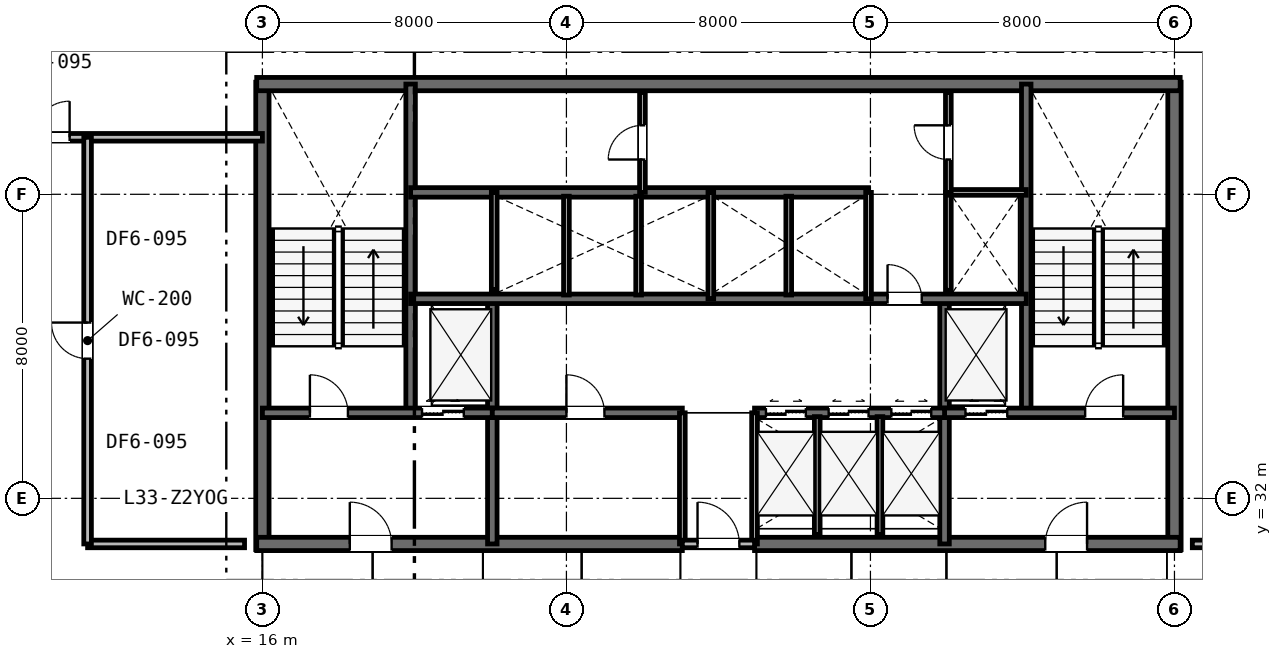
"""IFC4 building model, lengths in metres.
Left out: names, types, materials, properties, quantities, classifications, styles, units other than length and angle.
Written with IfcOpenShell. Run it as: python <this file> out.ifc"""

import sys

from ifc_helpers import new_model, si_unit, direction, frame, frame_2d, origin, place, context, subcontext, project, spatial, rectangle, extrude, element, fill, save


model = new_model("IFC4")
c1 = context("Model", 3, precision=1e-05, world=origin(), true_north=direction((0.0, 1.0)))
c2 = subcontext(c1, "Body", "Model", "MODEL_VIEW")
j1 = project(units=[si_unit("LENGTHUNIT", "METRE"), si_unit("PLANEANGLEUNIT", "RADIAN")], contexts=[c1])
p1 = place(None, origin())
s1 = spatial("IfcSite", under=j1, at=p1, CompositionType="ELEMENT")
p2 = place(p1, origin())
s2 = spatial("IfcBuilding", under=s1, at=p2, CompositionType="ELEMENT")
p3 = place(p2, frame((0.0, 0.0, 129.6)))
s3 = spatial("IfcBuildingStorey", under=s2, at=p3, CompositionType="ELEMENT", Elevation=129.6)
for number, where, z_axis, x_axis in (
    (1, (16.0, 30.65, 0.0), (0.0, 0.0, 1.0), (0.0, 1.0, 0.0)),
    (2, (40.0, 30.65, 0.0), (0.0, 0.0, 1.0), (0.0, 1.0, 0.0)),
):
    element("IfcWall", number, at=place(p3, frame(where, z_axis=z_axis, x_axis=x_axis)), inside=s3, PredefinedType="SHEAR", context=c2, shape_type="SweptSolid", body=[
        extrude(rectangle(XDim=12.3, YDim=0.35, at=frame_2d((6.15, 0.0))), origin(), (0.0, 0.0, 1.0), 3.6),
    ])
p4 = place(p3, frame((15.85, 42.9, 0.0), z_axis=(0.0, 0.0, 1.0), x_axis=(1.0, 0.0, 0.0)))
e3 = element("IfcWall", 3, at=p4, inside=s3, PredefinedType="SHEAR", context=c2, shape_type="SweptSolid", body=[
    extrude(rectangle(XDim=24.3, YDim=0.35, at=frame_2d((12.15, 0.0))), origin(), (0.0, 0.0, 1.0), 3.6),
])
p5 = place(p3, frame((15.85, 30.8, 0.0), z_axis=(0.0, 0.0, 1.0), x_axis=(1.0, 0.0, 0.0)))
e4 = element("IfcWall", 4, at=p5, inside=s3, PredefinedType="SHEAR", context=c2, shape_type="SweptSolid", body=[
    extrude(rectangle(XDim=11.2, YDim=0.35, at=frame_2d((5.6, 0.0))), origin(), (0.0, 0.0, 1.0), 3.6),
])
p6 = place(p5, frame((2.45, 0.0, 0.0)))
e5 = element("IfcOpeningElement", 5, at=p6, cuts=e4, PredefinedType="OPENING", context=c2, shape_type="SweptSolid", body=[
    extrude(rectangle(XDim=1.1, YDim=2.15, at=frame_2d((0.55, 1.075))), frame((0.0, 0.185, 0.0), z_axis=(0.0, -1.0, 0.0), x_axis=(1.0, 0.0, 0.0)), (0.0, 0.0, 1.0), 0.37),
])
p7 = place(p3, frame((28.95, 30.8, 0.0), z_axis=(0.0, 0.0, 1.0), x_axis=(1.0, 0.0, 0.0)))
e6 = element("IfcWall", 6, at=p7, inside=s3, PredefinedType="SHEAR", context=c2, shape_type="SweptSolid", body=[
    extrude(rectangle(XDim=11.2, YDim=0.35, at=frame_2d((5.6, 0.0))), origin(), (0.0, 0.0, 1.0), 3.6),
])
p8 = place(p7, frame((7.65, 0.0, 0.0)))
e7 = element("IfcOpeningElement", 7, at=p8, cuts=e6, PredefinedType="OPENING", context=c2, shape_type="SweptSolid", body=[
    extrude(rectangle(XDim=1.1, YDim=2.15, at=frame_2d((0.55, 1.075))), frame((0.0, 0.185, 0.0), z_axis=(0.0, -1.0, 0.0), x_axis=(1.0, 0.0, 0.0)), (0.0, 0.0, 1.0), 0.37),
])
for number, where, z_axis, x_axis in (
    (8, (19.9, 34.25, 0.0), (0.0, 0.0, 1.0), (0.0, 1.0, 0.0)),
    (9, (36.1, 34.25, 0.0), (0.0, 0.0, 1.0), (0.0, 1.0, 0.0)),
):
    element("IfcWall", number, at=place(p3, frame(where, z_axis=z_axis, x_axis=x_axis)), inside=s3, PredefinedType="SHEAR", context=c2, shape_type="SweptSolid", body=[
        extrude(rectangle(XDim=8.65, YDim=0.25, at=frame_2d((4.325, 0.0))), origin(), (0.0, 0.0, 1.0), 3.6),
    ])
for number, where, z_axis, x_axis in (
    (10, (22.05, 30.8, 0.0), (0.0, 0.0, 1.0), (0.0, 1.0, 0.0)),
    (11, (33.95, 30.8, 0.0), (0.0, 0.0, 1.0), (0.0, 1.0, 0.0)),
):
    element("IfcWall", number, at=place(p3, frame(where, z_axis=z_axis, x_axis=x_axis)), inside=s3, PredefinedType="SHEAR", context=c2, shape_type="SweptSolid", body=[
        extrude(rectangle(XDim=6.45, YDim=0.25, at=frame_2d((3.225, 0.0))), origin(), (0.0, 0.0, 1.0), 3.6),
    ])
p9 = place(p3, frame((16.0, 34.25, 0.0), z_axis=(0.0, 0.0, 1.0), x_axis=(1.0, 0.0, 0.0)))
e12 = element("IfcWall", 12, at=p9, inside=s3, PredefinedType="SHEAR", context=c2, shape_type="SweptSolid", body=[
    extrude(rectangle(XDim=6.05, YDim=0.25, at=frame_2d((3.025, 0.0))), origin(), (0.0, 0.0, 1.0), 3.6),
])
p10 = place(p9, frame((1.25, 0.0, 0.0)))
e13 = element("IfcOpeningElement", 13, at=p10, cuts=e12, PredefinedType="OPENING", context=c2, shape_type="SweptSolid", body=[
    extrude(rectangle(XDim=1.0, YDim=2.15, at=frame_2d((0.5, 1.075))), frame((0.0, 0.135, 0.0), z_axis=(0.0, -1.0, 0.0), x_axis=(1.0, 0.0, 0.0)), (0.0, 0.0, 1.0), 0.27),
])
p11 = place(p9, frame((4.2, 0.0, 0.0)))
e14 = element("IfcOpeningElement", 14, at=p11, cuts=e12, PredefinedType="OPENING", context=c2, shape_type="SweptSolid", body=[
    extrude(rectangle(XDim=1.1, YDim=2.15, at=frame_2d((0.55, 1.075))), frame((0.0, 0.135, 0.0), z_axis=(0.0, -1.0, 0.0), x_axis=(1.0, 0.0, 0.0)), (0.0, 0.0, 1.0), 0.27),
])
p12 = place(p3, frame((33.95, 34.25, 0.0), z_axis=(0.0, 0.0, 1.0), x_axis=(1.0, 0.0, 0.0)))
e15 = element("IfcWall", 15, at=p12, inside=s3, PredefinedType="SHEAR", context=c2, shape_type="SweptSolid", body=[
    extrude(rectangle(XDim=6.05, YDim=0.25, at=frame_2d((3.025, 0.0))), origin(), (0.0, 0.0, 1.0), 3.6),
])
p13 = place(p12, frame((3.7, 0.0, 0.0)))
e16 = element("IfcOpeningElement", 16, at=p13, cuts=e15, PredefinedType="OPENING", context=c2, shape_type="SweptSolid", body=[
    extrude(rectangle(XDim=1.0, YDim=2.15, at=frame_2d((0.5, 1.075))), frame((0.0, 0.135, 0.0), z_axis=(0.0, -1.0, 0.0), x_axis=(1.0, 0.0, 0.0)), (0.0, 0.0, 1.0), 0.27),
])
p14 = place(p12, frame((0.55, 0.0, 0.0)))
e17 = element("IfcOpeningElement", 17, at=p14, cuts=e15, PredefinedType="OPENING", context=c2, shape_type="SweptSolid", body=[
    extrude(rectangle(XDim=1.1, YDim=2.15, at=frame_2d((0.55, 1.075))), frame((0.0, 0.135, 0.0), z_axis=(0.0, -1.0, 0.0), x_axis=(1.0, 0.0, 0.0)), (0.0, 0.0, 1.0), 0.27),
])
p15 = place(p3, frame((22.05, 34.25, 0.0), z_axis=(0.0, 0.0, 1.0), x_axis=(1.0, 0.0, 0.0)))
e18 = element("IfcWall", 18, at=p15, inside=s3, PredefinedType="SHEAR", context=c2, shape_type="SweptSolid", body=[
    extrude(rectangle(XDim=5.0, YDim=0.25, at=frame_2d((2.5, 0.0))), origin(), (0.0, 0.0, 1.0), 3.6),
])
p16 = place(p15, frame((1.95, 0.0, 0.0)))
e19 = element("IfcOpeningElement", 19, at=p16, cuts=e18, PredefinedType="OPENING", context=c2, shape_type="SweptSolid", body=[
    extrude(rectangle(XDim=1.0, YDim=2.15, at=frame_2d((0.5, 1.075))), frame((0.0, 0.135, 0.0), z_axis=(0.0, -1.0, 0.0), x_axis=(1.0, 0.0, 0.0)), (0.0, 0.0, 1.0), 0.27),
])
p17 = place(p3, frame((28.95, 34.25, 0.0), z_axis=(0.0, 0.0, 1.0), x_axis=(1.0, 0.0, 0.0)))
e20 = element("IfcWall", 20, at=p17, inside=s3, PredefinedType="SHEAR", context=c2, shape_type="SweptSolid", body=[
    extrude(rectangle(XDim=5.0, YDim=0.25, at=frame_2d((2.5, 0.0))), origin(), (0.0, 0.0, 1.0), 3.6),
])
p18 = place(p17, frame((0.3, 0.0, 0.0)))
e21 = element("IfcOpeningElement", 21, at=p18, cuts=e20, PredefinedType="OPENING", context=c2, shape_type="SweptSolid", body=[
    extrude(rectangle(XDim=1.05, YDim=2.15, at=frame_2d((0.525, 1.075))), frame((0.0, 0.135, 0.0), z_axis=(0.0, -1.0, 0.0), x_axis=(1.0, 0.0, 0.0)), (0.0, 0.0, 1.0), 0.27),
])
p19 = place(p17, frame((1.95, 0.0, 0.0)))
e22 = element("IfcOpeningElement", 22, at=p19, cuts=e20, PredefinedType="OPENING", context=c2, shape_type="SweptSolid", body=[
    extrude(rectangle(XDim=1.05, YDim=2.15, at=frame_2d((0.525, 1.075))), frame((0.0, 0.135, 0.0), z_axis=(0.0, -1.0, 0.0), x_axis=(1.0, 0.0, 0.0)), (0.0, 0.0, 1.0), 0.27),
])
p20 = place(p17, frame((3.6, 0.0, 0.0)))
e23 = element("IfcOpeningElement", 23, at=p20, cuts=e20, PredefinedType="OPENING", context=c2, shape_type="SweptSolid", body=[
    extrude(rectangle(XDim=1.05, YDim=2.15, at=frame_2d((0.525, 1.075))), frame((0.0, 0.135, 0.0), z_axis=(0.0, -1.0, 0.0), x_axis=(1.0, 0.0, 0.0)), (0.0, 0.0, 1.0), 0.27),
])
p21 = place(p3, frame((19.9, 37.25, 0.0), z_axis=(0.0, 0.0, 1.0), x_axis=(1.0, 0.0, 0.0)))
e24 = element("IfcWall", 24, at=p21, inside=s3, PredefinedType="SHEAR", context=c2, shape_type="SweptSolid", body=[
    extrude(rectangle(XDim=16.2, YDim=0.25, at=frame_2d((8.1, 0.0))), origin(), (0.0, 0.0, 1.0), 3.6),
])
p22 = place(p21, frame((12.55, 0.0, 0.0)))
e25 = element("IfcOpeningElement", 25, at=p22, cuts=e24, PredefinedType="OPENING", context=c2, shape_type="SweptSolid", body=[
    extrude(rectangle(XDim=0.9, YDim=2.15, at=frame_2d((0.45, 1.075))), frame((0.0, 0.135, 0.0), z_axis=(0.0, -1.0, 0.0), x_axis=(1.0, 0.0, 0.0)), (0.0, 0.0, 1.0), 0.27),
])
p23 = place(p3, frame((19.9, 40.05, 0.0), z_axis=(0.0, 0.0, 1.0), x_axis=(1.0, 0.0, 0.0)))
e26 = element("IfcWall", 26, at=p23, inside=s3, PredefinedType="SHEAR", context=c2, shape_type="SweptSolid", body=[
    extrude(rectangle(XDim=12.05, YDim=0.25, at=frame_2d((6.025, 0.0))), origin(), (0.0, 0.0, 1.0), 3.6),
])
p24 = place(p3, frame((27.05, 30.8, 0.0), z_axis=(0.0, 0.0, 1.0), x_axis=(0.0, 1.0, 0.0)))
e27 = element("IfcWall", 27, at=p24, inside=s3, PredefinedType="PLUMBINGWALL", context=c2, shape_type="SweptSolid", body=[
    extrude(rectangle(XDim=3.45, YDim=0.15, at=frame_2d((1.725, 0.0))), origin(), (0.0, 0.0, 1.0), 3.01),
])
p25 = place(p3, frame((28.95, 30.8, 0.0), z_axis=(0.0, 0.0, 1.0), x_axis=(0.0, 1.0, 0.0)))
e28 = element("IfcWall", 28, at=p25, inside=s3, PredefinedType="PLUMBINGWALL", context=c2, shape_type="SweptSolid", body=[
    extrude(rectangle(XDim=3.45, YDim=0.15, at=frame_2d((1.725, 0.0))), origin(), (0.0, 0.0, 1.0), 3.33),
])
p26 = place(p3, frame((27.05, 30.8, 0.0), z_axis=(0.0, 0.0, 1.0), x_axis=(1.0, 0.0, 0.0)))
e29 = element("IfcWall", 29, at=p26, inside=s3, PredefinedType="PARTITIONING", context=c2, shape_type="SweptSolid", body=[
    extrude(rectangle(XDim=1.9, YDim=0.2, at=frame_2d((0.95, 0.0))), origin(), (0.0, 0.0, 1.0), 3.01),
])
p27 = place(p26, frame((0.4, 0.0, 0.0)))
e30 = element("IfcOpeningElement", 30, at=p27, cuts=e29, PredefinedType="OPENING", context=c2, shape_type="SweptSolid", body=[
    extrude(rectangle(XDim=1.1, YDim=2.15, at=frame_2d((0.55, 1.075))), frame((0.0, 0.11, 0.0), z_axis=(0.0, -1.0, 0.0), x_axis=(1.0, 0.0, 0.0)), (0.0, 0.0, 1.0), 0.22),
])
for number, where, z_axis, x_axis in (
    (31, (30.6, 31.05, 0.0), (0.0, 0.0, 1.0), (0.0, 1.0, 0.0)),
    (32, (32.25, 31.05, 0.0), (0.0, 0.0, 1.0), (0.0, 1.0, 0.0)),
):
    element("IfcWall", number, at=place(p3, frame(where, z_axis=z_axis, x_axis=x_axis)), inside=s3, PredefinedType="PLUMBINGWALL", context=c2, shape_type="SweptSolid", body=[
        extrude(rectangle(XDim=3.1, YDim=0.15, at=frame_2d((1.55, 0.0))), origin(), (0.0, 0.0, 1.0), 3.33),
    ])
p28 = place(p3, frame((22.1, 37.49, 0.0), z_axis=(0.0, 0.0, 1.0), x_axis=(0.0, 1.0, 0.0)))
e33 = element("IfcWall", 33, at=p28, inside=s3, PredefinedType="PLUMBINGWALL", context=c2, shape_type="SweptSolid", body=[
    extrude(rectangle(XDim=2.56, YDim=0.15, at=frame_2d((1.28, 0.0))), origin(), (0.0, 0.0, 1.0), 3.33),
])
p29 = place(p3, frame((27.8, 37.25, 0.0), z_axis=(0.0, 0.0, 1.0), x_axis=(0.0, 1.0, 0.0)))
e34 = element("IfcWall", 34, at=p29, inside=s3, PredefinedType="PLUMBINGWALL", context=c2, shape_type="SweptSolid", body=[
    extrude(rectangle(XDim=2.8, YDim=0.15, at=frame_2d((1.4, 0.0))), origin(), (0.0, 0.0, 1.0), 3.33),
])
for number, where, z_axis, x_axis in (
    (35, (24.0, 37.35, 0.0), (0.0, 0.0, 1.0), (0.0, 1.0, 0.0)),
    (36, (25.9, 37.35, 0.0), (0.0, 0.0, 1.0), (0.0, 1.0, 0.0)),
):
    element("IfcWall", number, at=place(p3, frame(where, z_axis=z_axis, x_axis=x_axis)), inside=s3, PredefinedType="PLUMBINGWALL", context=c2, shape_type="SweptSolid", body=[
        extrude(rectangle(XDim=2.6, YDim=0.15, at=frame_2d((1.3, 0.0))), origin(), (0.0, 0.0, 1.0), 3.33),
    ])
p30 = place(p3, frame((31.95, 37.25, 0.0), z_axis=(0.0, 0.0, 1.0), x_axis=(0.0, 1.0, 0.0)))
e37 = element("IfcWall", 37, at=p30, inside=s3, PredefinedType="PLUMBINGWALL", context=c2, shape_type="SweptSolid", body=[
    extrude(rectangle(XDim=2.8, YDim=0.15, at=frame_2d((1.4, 0.0))), origin(), (0.0, 0.0, 1.0), 3.33),
])
p31 = place(p3, frame((29.85, 37.35, 0.0), z_axis=(0.0, 0.0, 1.0), x_axis=(0.0, 1.0, 0.0)))
e38 = element("IfcWall", 38, at=p31, inside=s3, PredefinedType="PLUMBINGWALL", context=c2, shape_type="SweptSolid", body=[
    extrude(rectangle(XDim=2.6, YDim=0.15, at=frame_2d((1.3, 0.0))), origin(), (0.0, 0.0, 1.0), 3.33),
])
p32 = place(p3, frame((34.05, 37.473, 0.0), z_axis=(0.0, 0.0, 1.0), x_axis=(0.0, 1.0, 0.0)))
e39 = element("IfcWall", 39, at=p32, inside=s3, PredefinedType="PLUMBINGWALL", context=c2, shape_type="SweptSolid", body=[
    extrude(rectangle(XDim=2.577, YDim=0.15, at=frame_2d((1.288, 0.0))), origin(), (0.0, 0.0, 1.0), 3.33),
])
p33 = place(p3, frame((34.05, 40.05, 0.0), z_axis=(0.0, 0.0, 1.0), x_axis=(1.0, 0.0, 0.0)))
e40 = element("IfcWall", 40, at=p33, inside=s3, PredefinedType="PARTITIONING", context=c2, shape_type="SweptSolid", body=[
    extrude(rectangle(XDim=2.05, YDim=0.15, at=frame_2d((1.025, 0.0))), origin(), (0.0, 0.0, 1.0), 3.33),
])
p34 = place(p3, frame((34.05, 40.05, 0.0), z_axis=(0.0, 0.0, 1.0), x_axis=(0.0, 1.0, 0.0)))
e41 = element("IfcWall", 41, at=p34, inside=s3, PredefinedType="PARTITIONING", context=c2, shape_type="SweptSolid", body=[
    extrude(rectangle(XDim=2.63, YDim=0.15, at=frame_2d((1.315, 0.0))), origin(), (0.0, 0.0, 1.0), 3.33),
])
p35 = place(p34, frame((0.865, 0.0, 0.0)))
e42 = element("IfcOpeningElement", 42, at=p35, cuts=e41, PredefinedType="OPENING", context=c2, shape_type="SweptSolid", body=[
    extrude(rectangle(XDim=0.9, YDim=2.15, at=frame_2d((0.45, 1.075))), frame((0.0, 0.085, 0.0), z_axis=(0.0, -1.0, 0.0), x_axis=(1.0, 0.0, 0.0)), (0.0, 0.0, 1.0), 0.17),
])
p36 = place(p3, frame((26.0, 40.05, 0.0), z_axis=(0.0, 0.0, 1.0), x_axis=(0.0, 1.0, 0.0)))
e43 = element("IfcWall", 43, at=p36, inside=s3, PredefinedType="PARTITIONING", context=c2, shape_type="SweptSolid", body=[
    extrude(rectangle(XDim=2.63, YDim=0.15, at=frame_2d((1.315, 0.0))), origin(), (0.0, 0.0, 1.0), 3.33),
])
p37 = place(p36, frame((0.865, 0.0, 0.0)))
e44 = element("IfcOpeningElement", 44, at=p37, cuts=e43, PredefinedType="OPENING", context=c2, shape_type="SweptSolid", body=[
    extrude(rectangle(XDim=0.9, YDim=2.15, at=frame_2d((0.45, 1.075))), frame((0.0, 0.085, 0.0), z_axis=(0.0, -1.0, 0.0), x_axis=(1.0, 0.0, 0.0)), (0.0, 0.0, 1.0), 0.17),
])
p38 = place(p3, frame((11.4, 30.8, 0.0), z_axis=(0.0, 0.0, 1.0), x_axis=(1.0, 0.0, 0.0)))
e45 = element("IfcWall", 45, at=p38, inside=s3, PredefinedType="PARTITIONING", context=c2, shape_type="SweptSolid", body=[
    extrude(rectangle(XDim=4.13, YDim=0.2, at=frame_2d((2.065, 0.0))), origin(), (0.0, 0.0, 1.0), 2.87),
])
p39 = place(p3, frame((40.47, 30.8, 0.0), z_axis=(0.0, 0.0, 1.0), x_axis=(1.0, 0.0, 0.0)))
e46 = element("IfcWall", 46, at=p39, inside=s3, PredefinedType="PARTITIONING", context=c2, shape_type="SweptSolid", body=[
    extrude(rectangle(XDim=1.73, YDim=0.2, at=frame_2d((0.865, 0.0))), origin(), (0.0, 0.0, 1.0), 2.87),
])
p40 = place(p3, frame((0.1, 41.5, 0.0), z_axis=(0.0, 0.0, 1.0), x_axis=(1.0, 0.0, 0.0)))
e47 = element("IfcWall", 47, at=p40, inside=s3, PredefinedType="PARTITIONING", context=c2, shape_type="SweptSolid", body=[
    extrude(rectangle(XDim=15.9, YDim=0.2, at=frame_2d((7.95, 0.0))), origin(), (0.0, 0.0, 1.0), 2.87),
])
p41 = place(p40, frame((9.877, 0.0, 0.0)))
e48 = element("IfcOpeningElement", 48, at=p41, cuts=e47, PredefinedType="OPENING", context=c2, shape_type="SweptSolid", body=[
    extrude(rectangle(XDim=0.95, YDim=2.15, at=frame_2d((0.475, 1.075))), frame((0.0, 0.11, 0.0), z_axis=(0.0, -1.0, 0.0), x_axis=(1.0, 0.0, 0.0)), (0.0, 0.0, 1.0), 0.22),
])
p42 = place(p3, frame((11.4, 30.8, 0.0), z_axis=(0.0, 0.0, 1.0), x_axis=(0.0, 1.0, 0.0)))
e49 = element("IfcWall", 49, at=p42, inside=s3, PredefinedType="PARTITIONING", context=c2, shape_type="SweptSolid", body=[
    extrude(rectangle(XDim=10.7, YDim=0.2, at=frame_2d((5.35, 0.0))), origin(), (0.0, 0.0, 1.0), 2.87),
])
p43 = place(p42, frame((4.875, 0.0, 0.0)))
e50 = element("IfcOpeningElement", 50, at=p43, cuts=e49, PredefinedType="OPENING", context=c2, shape_type="SweptSolid", body=[
    extrude(rectangle(XDim=0.95, YDim=2.15, at=frame_2d((0.475, 1.075))), frame((0.0, 0.11, 0.0), z_axis=(0.0, -1.0, 0.0), x_axis=(1.0, 0.0, 0.0)), (0.0, 0.0, 1.0), 0.22),
])
p44 = place(p27, origin())
e51 = element("IfcDoor", 51, at=p44, inside=s3, OperationType="SINGLE_SWING_LEFT", PredefinedType="DOOR", context=c2, shape_type="SweptSolid", body=[
    extrude(rectangle(XDim=1.1, YDim=2.15, at=frame_2d((0.55, 1.075))), frame((0.0, 0.025, 0.0), z_axis=(0.0, -1.0, 0.0), x_axis=(1.0, 0.0, 0.0)), (0.0, 0.0, 1.0), 0.05),
])
fill(e30, e51)
p45 = place(p10, origin())
e52 = element("IfcDoor", 52, at=p45, inside=s3, OperationType="SINGLE_SWING_LEFT", PredefinedType="DOOR", context=c2, shape_type="SweptSolid", body=[
    extrude(rectangle(XDim=1.0, YDim=2.15, at=frame_2d((0.5, 1.075))), frame((0.0, 0.025, 0.0), z_axis=(0.0, -1.0, 0.0), x_axis=(1.0, 0.0, 0.0)), (0.0, 0.0, 1.0), 0.05),
])
fill(e13, e52)
p46 = place(p13, origin())
e53 = element("IfcDoor", 53, at=p46, inside=s3, OperationType="SINGLE_SWING_RIGHT", PredefinedType="DOOR", context=c2, shape_type="SweptSolid", body=[
    extrude(rectangle(XDim=1.0, YDim=2.15, at=frame_2d((0.5, 1.075))), frame((0.0, 0.025, 0.0), z_axis=(0.0, -1.0, 0.0), x_axis=(1.0, 0.0, 0.0)), (0.0, 0.0, 1.0), 0.05),
])
fill(e16, e53)
p47 = place(p6, origin())
e54 = element("IfcDoor", 54, at=p47, inside=s3, OperationType="SINGLE_SWING_LEFT", PredefinedType="DOOR", context=c2, shape_type="SweptSolid", body=[
    extrude(rectangle(XDim=1.1, YDim=2.15, at=frame_2d((0.55, 1.075))), frame((0.0, 0.025, 0.0), z_axis=(0.0, -1.0, 0.0), x_axis=(1.0, 0.0, 0.0)), (0.0, 0.0, 1.0), 0.05),
])
fill(e5, e54)
p48 = place(p8, origin())
e55 = element("IfcDoor", 55, at=p48, inside=s3, OperationType="SINGLE_SWING_RIGHT", PredefinedType="DOOR", context=c2, shape_type="SweptSolid", body=[
    extrude(rectangle(XDim=1.1, YDim=2.15, at=frame_2d((0.55, 1.075))), frame((0.0, 0.025, 0.0), z_axis=(0.0, -1.0, 0.0), x_axis=(1.0, 0.0, 0.0)), (0.0, 0.0, 1.0), 0.05),
])
fill(e7, e55)
p49 = place(p16, origin())
e56 = element("IfcDoor", 56, at=p49, inside=s3, OperationType="SINGLE_SWING_LEFT", PredefinedType="DOOR", context=c2, shape_type="SweptSolid", body=[
    extrude(rectangle(XDim=1.0, YDim=2.15, at=frame_2d((0.5, 1.075))), frame((0.0, 0.025, 0.0), z_axis=(0.0, -1.0, 0.0), x_axis=(1.0, 0.0, 0.0)), (0.0, 0.0, 1.0), 0.05),
])
fill(e19, e56)
p50 = place(p22, origin())
e57 = element("IfcDoor", 57, at=p50, inside=s3, OperationType="SINGLE_SWING_LEFT", PredefinedType="DOOR", context=c2, shape_type="SweptSolid", body=[
    extrude(rectangle(XDim=0.9, YDim=2.15, at=frame_2d((0.45, 1.075))), frame((0.0, 0.025, 0.0), z_axis=(0.0, -1.0, 0.0), x_axis=(1.0, 0.0, 0.0)), (0.0, 0.0, 1.0), 0.05),
])
fill(e25, e57)
p51 = place(p35, origin())
e58 = element("IfcDoor", 58, at=p51, inside=s3, OperationType="SINGLE_SWING_RIGHT", PredefinedType="DOOR", context=c2, shape_type="SweptSolid", body=[
    extrude(rectangle(XDim=0.9, YDim=2.15, at=frame_2d((0.45, 1.075))), frame((0.0, 0.025, 0.0), z_axis=(0.0, -1.0, 0.0), x_axis=(1.0, 0.0, 0.0)), (0.0, 0.0, 1.0), 0.05),
])
fill(e42, e58)
p52 = place(p37, origin())
e59 = element("IfcDoor", 59, at=p52, inside=s3, OperationType="SINGLE_SWING_LEFT", PredefinedType="DOOR", context=c2, shape_type="SweptSolid", body=[
    extrude(rectangle(XDim=0.9, YDim=2.15, at=frame_2d((0.45, 1.075))), frame((0.0, 0.025, 0.0), z_axis=(0.0, -1.0, 0.0), x_axis=(1.0, 0.0, 0.0)), (0.0, 0.0, 1.0), 0.05),
])
fill(e44, e59)
p53 = place(p41, origin())
e60 = element("IfcDoor", 60, at=p53, inside=s3, OperationType="SINGLE_SWING_RIGHT", PredefinedType="DOOR", context=c2, shape_type="SweptSolid", body=[
    extrude(rectangle(XDim=0.95, YDim=2.15, at=frame_2d((0.475, 1.075))), frame((0.0, 0.025, 0.0), z_axis=(0.0, -1.0, 0.0), x_axis=(1.0, 0.0, 0.0)), (0.0, 0.0, 1.0), 0.05),
])
fill(e48, e60)
p54 = place(p43, origin())
e61 = element("IfcDoor", 61, at=p54, inside=s3, OperationType="SINGLE_SWING_RIGHT", PredefinedType="DOOR", context=c2, shape_type="SweptSolid", body=[
    extrude(rectangle(XDim=0.95, YDim=2.15, at=frame_2d((0.475, 1.075))), frame((0.0, 0.025, 0.0), z_axis=(0.0, -1.0, 0.0), x_axis=(1.0, 0.0, 0.0)), (0.0, 0.0, 1.0), 0.05),
])
fill(e50, e61)
p55 = place(p11, origin())
e62 = element("IfcDoor", 62, at=p55, inside=s3, OperationType="DOUBLE_DOOR_SLIDING", PredefinedType="DOOR", context=c2, shape_type="SweptSolid", body=[
    extrude(rectangle(XDim=1.1, YDim=2.15, at=frame_2d((0.55, 1.075))), frame((0.0, 0.025, 0.0), z_axis=(0.0, -1.0, 0.0), x_axis=(1.0, 0.0, 0.0)), (0.0, 0.0, 1.0), 0.05),
])
fill(e14, e62)
p56 = place(p14, origin())
e63 = element("IfcDoor", 63, at=p56, inside=s3, OperationType="DOUBLE_DOOR_SLIDING", PredefinedType="DOOR", context=c2, shape_type="SweptSolid", body=[
    extrude(rectangle(XDim=1.1, YDim=2.15, at=frame_2d((0.55, 1.075))), frame((0.0, 0.025, 0.0), z_axis=(0.0, -1.0, 0.0), x_axis=(1.0, 0.0, 0.0)), (0.0, 0.0, 1.0), 0.05),
])
fill(e17, e63)
p57 = place(p18, origin())
e64 = element("IfcDoor", 64, at=p57, inside=s3, OperationType="DOUBLE_DOOR_SLIDING", PredefinedType="DOOR", context=c2, shape_type="SweptSolid", body=[
    extrude(rectangle(XDim=1.05, YDim=2.15, at=frame_2d((0.525, 1.075))), frame((0.0, 0.025, 0.0), z_axis=(0.0, -1.0, 0.0), x_axis=(1.0, 0.0, 0.0)), (0.0, 0.0, 1.0), 0.05),
])
fill(e21, e64)
p58 = place(p19, origin())
e65 = element("IfcDoor", 65, at=p58, inside=s3, OperationType="DOUBLE_DOOR_SLIDING", PredefinedType="DOOR", context=c2, shape_type="SweptSolid", body=[
    extrude(rectangle(XDim=1.05, YDim=2.15, at=frame_2d((0.525, 1.075))), frame((0.0, 0.025, 0.0), z_axis=(0.0, -1.0, 0.0), x_axis=(1.0, 0.0, 0.0)), (0.0, 0.0, 1.0), 0.05),
])
fill(e22, e65)
p59 = place(p20, origin())
e66 = element("IfcDoor", 66, at=p59, inside=s3, OperationType="DOUBLE_DOOR_SLIDING", PredefinedType="DOOR", context=c2, shape_type="SweptSolid", body=[
    extrude(rectangle(XDim=1.05, YDim=2.15, at=frame_2d((0.525, 1.075))), frame((0.0, 0.025, 0.0), z_axis=(0.0, -1.0, 0.0), x_axis=(1.0, 0.0, 0.0)), (0.0, 0.0, 1.0), 0.05),
])
fill(e23, e66)
save(model, sys.argv[1])
